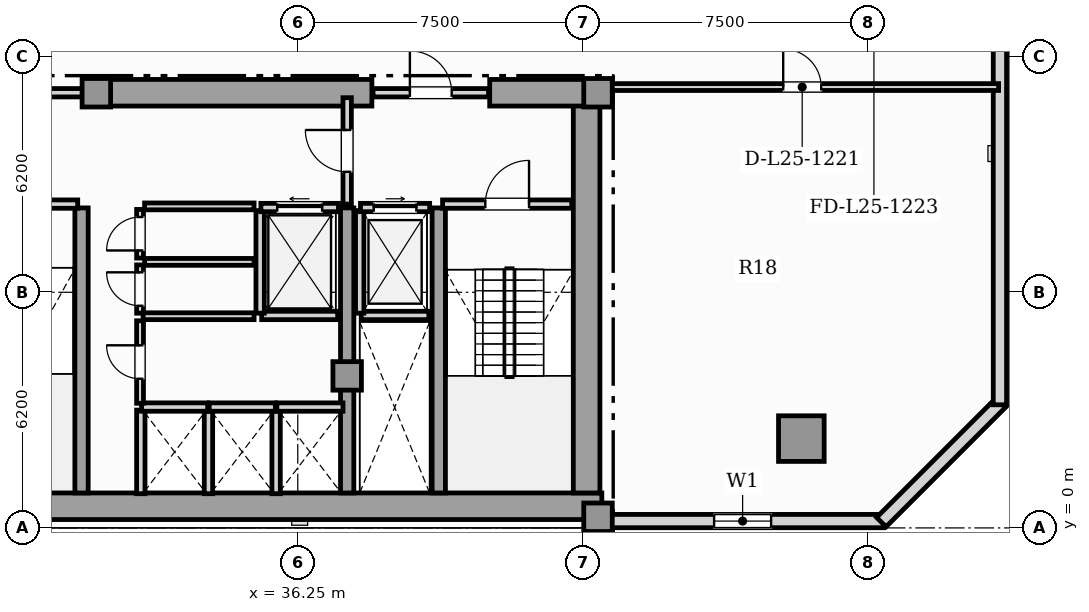
"""IFC4 building model, lengths in metres.
Left out: names, types, materials, properties, quantities, classifications, styles, units other than length and angle.
Written with IfcOpenShell. Run it as: python <this file> out.ifc"""

import sys

from ifc_helpers import new_model, si_unit, direction, frame, frame_2d, origin, origin_2d, place, context, subcontext, project, spatial, rectangle, hollow_rectangle, extrude, element, fill, save


model = new_model("IFC4")
c1 = context("Model", 3, precision=1e-05, world=origin(), true_north=direction((0.0, 1.0)))
c2 = subcontext(c1, "Body", "Model", "MODEL_VIEW")
j1 = project(units=[si_unit("LENGTHUNIT", "METRE"), si_unit("PLANEANGLEUNIT", "RADIAN")], contexts=[c1])
p1 = place(None, origin())
s1 = spatial("IfcSite", under=j1, at=p1, CompositionType="ELEMENT")
p2 = place(p1, origin())
s2 = spatial("IfcBuilding", under=s1, at=p2, CompositionType="ELEMENT")
p3 = place(p2, frame((0.0, 0.0, 104.15)))
s3 = spatial("IfcBuildingStorey", under=s2, at=p3, CompositionType="ELEMENT", Elevation=104.15)
p4 = place(p3, frame((13.25, 0.57, 0.0), z_axis=(0.0, 0.0, 1.0), x_axis=(1.0, 0.0, 0.0)))
e1 = element("IfcWall", 1, at=p4, inside=s3, PredefinedType="SHEAR", context=c2, shape_type="SweptSolid", body=[
    extrude(rectangle(XDim=31.0, YDim=0.7, at=frame_2d((15.5, 0.0))), origin(), (0.0, 0.0, 1.0), 3.6),
])
p5 = place(p3, frame((43.85, 0.92, 0.0), z_axis=(0.0, 0.0, 1.0), x_axis=(0.0, 1.0, 0.0)))
e2 = element("IfcWall", 2, at=p5, inside=s3, PredefinedType="SHEAR", context=c2, shape_type="SweptSolid", body=[
    extrude(rectangle(XDim=10.53, YDim=0.7, at=frame_2d((5.265, 0.0))), origin(), (0.0, 0.0, 1.0), 3.6),
])
p6 = place(p3, frame((30.9, 11.45, 0.0), z_axis=(0.0, 0.0, 1.0), x_axis=(1.0, 0.0, 0.0)))
e3 = element("IfcWall", 3, at=p6, inside=s3, PredefinedType="SHEAR", context=c2, shape_type="SweptSolid", body=[
    extrude(rectangle(XDim=7.3, YDim=0.7, at=frame_2d((3.65, 0.0))), origin(), (0.0, 0.0, 1.0), 3.6),
])
p7 = place(p3, frame((41.3, 11.45, 0.0), z_axis=(0.0, 0.0, 1.0), x_axis=(1.0, 0.0, 0.0)))
e4 = element("IfcWall", 4, at=p7, inside=s3, PredefinedType="SHEAR", context=c2, shape_type="SweptSolid", body=[
    extrude(rectangle(XDim=2.95, YDim=0.7, at=frame_2d((1.475, 0.0))), origin(), (0.0, 0.0, 1.0), 3.6),
])
for number, where, z_axis, x_axis in (
    (5, (30.56, 0.92, 0.0), (0.0, 0.0, 1.0), (0.0, 1.0, 0.0)),
    (6, (37.55, 0.92, 0.0), (0.0, 0.0, 1.0), (0.0, 1.0, 0.0)),
    (7, (39.96, 0.92, 0.0), (0.0, 0.0, 1.0), (0.0, 1.0, 0.0)),
):
    element("IfcWall", number, at=place(p3, frame(where, z_axis=z_axis, x_axis=x_axis)), inside=s3, PredefinedType="SHEAR", context=c2, shape_type="SweptSolid", body=[
        extrude(rectangle(XDim=7.5, YDim=0.35, at=frame_2d((3.75, 0.0))), origin(), (0.0, 0.0, 1.0), 3.6),
    ])
for number, where, z_axis, x_axis in (
    (8, (44.15, 0.28, 0.0), (0.0, 0.0, 1.0), (1.0, 0.0, 0.0)),
    (9, (44.15, 11.45, 0.0), (0.0, 0.0, 1.0), (1.0, 0.0, 0.0)),
    (10, (37.55, 4.0, 0.0), (0.0, 0.0, 1.0), (1.0, 0.0, 0.0)),
    (11, (30.95, 11.45, 0.0), (0.0, 0.0, 1.0), (1.0, 0.0, 0.0)),
):
    element("IfcColumn", number, at=place(p3, frame(where, z_axis=z_axis, x_axis=x_axis)), inside=s3, PredefinedType="COLUMN", context=c2, shape_type="SweptSolid", body=[
        extrude(rectangle(XDim=0.75, YDim=0.75, at=origin_2d()), origin(), (0.0, 0.0, 1.0), 3.85),
    ])
p8 = place(p3, frame((49.5, 2.35, 0.0), z_axis=(0.0, 0.0, 1.0), x_axis=(1.0, 0.0, 0.0)))
e12 = element("IfcColumn", 12, at=p8, inside=s3, PredefinedType="USERDEFINED", context=c2, shape_type="SweptSolid", body=[
    extrude(hollow_rectangle(XDim=1.2, YDim=1.2, WallThickness=0.07, at=origin_2d()), origin(), (0.0, 0.0, 1.0), 3.85),
])
p9 = place(p3, frame((44.25, 0.18, 0.0), z_axis=(0.0, 0.0, 1.0), x_axis=(1.0, 0.0, 0.0)))
e13 = element("IfcWall", 13, at=p9, inside=s3, PredefinedType="SOLIDWALL", context=c2, shape_type="SweptSolid", body=[
    extrude(rectangle(XDim=7.41, YDim=0.35, at=frame_2d((3.705, 0.0))), origin(), (0.0, 0.0, 1.0), 3.6),
])
p10 = place(p9, frame((2.955, 0.0, 0.9)))
e14 = element("IfcOpeningElement", 14, at=p10, cuts=e13, PredefinedType="OPENING", context=c2, shape_type="SweptSolid", body=[
    extrude(rectangle(XDim=1.5, YDim=1.95, at=frame_2d((0.75, 0.975))), frame((0.0, 0.185, 0.0), z_axis=(0.0, -1.0, 0.0), x_axis=(1.0, 0.0, 0.0)), (0.0, 0.0, 1.0), 0.37),
])
p11 = place(p3, frame((51.604, 0.152, 0.0), z_axis=(0.0, 0.0, 1.0), x_axis=(0.707134240044, 0.707079321262, 0.0)))
e15 = element("IfcWall", 15, at=p11, inside=s3, PredefinedType="SOLIDWALL", context=c2, shape_type="SweptSolid", body=[
    extrude(rectangle(XDim=4.446, YDim=0.35, at=frame_2d((2.223, 0.0))), origin(), (0.0, 0.0, 1.0), 3.6),
])
p12 = place(p3, frame((54.725, 3.24, 0.0), z_axis=(0.0, 0.0, 1.0), x_axis=(0.0, 1.0, 0.0)))
e16 = element("IfcWall", 16, at=p12, inside=s3, PredefinedType="SOLIDWALL", context=c2, shape_type="SweptSolid", body=[
    extrude(rectangle(XDim=19.77, YDim=0.35, at=frame_2d((9.885, 0.0))), origin(), (0.0, 0.0, 1.0), 3.6),
])
p13 = place(p12, frame((12.784, 0.0, 0.9)))
e17 = element("IfcOpeningElement", 17, at=p13, cuts=e16, PredefinedType="OPENING", context=c2, shape_type="SweptSolid", body=[
    extrude(rectangle(XDim=1.5, YDim=1.95, at=frame_2d((0.75, 0.975))), frame((0.0, 0.185, 0.0), z_axis=(0.0, -1.0, 0.0), x_axis=(1.0, 0.0, 0.0)), (0.0, 0.0, 1.0), 0.37),
])
p14 = place(p3, frame((37.92, 5.59, 0.0), z_axis=(0.0, 0.0, 1.0), x_axis=(1.0, 0.0, 0.0)))
e18 = element("IfcWall", 18, at=p14, inside=s3, PredefinedType="SOLIDWALL", context=c2, shape_type="SweptSolid", body=[
    extrude(rectangle(XDim=1.78, YDim=0.22, at=frame_2d((0.89, 0.0))), origin(), (0.0, 0.0, 1.0), 3.6),
])
p15 = place(p3, frame((37.88, 5.65, 0.0), z_axis=(0.0, 0.0, 1.0), x_axis=(0.0, 1.0, 0.0)))
e19 = element("IfcWall", 19, at=p15, inside=s3, PredefinedType="SOLIDWALL", context=c2, shape_type="SweptSolid", body=[
    extrude(rectangle(XDim=2.7, YDim=0.22, at=frame_2d((1.35, 0.0))), origin(), (0.0, 0.0, 1.0), 3.6),
])
p16 = place(p3, frame((37.9, 8.43, 0.0), z_axis=(0.0, 0.0, 1.0), x_axis=(1.0, 0.0, 0.0)))
e20 = element("IfcWall", 20, at=p16, inside=s3, PredefinedType="SOLIDWALL", context=c2, shape_type="SweptSolid", body=[
    extrude(rectangle(XDim=1.82, YDim=0.22, at=frame_2d((0.91, 0.0))), origin(), (0.0, 0.0, 1.0), 3.6),
])
p17 = place(p16, frame((0.35, 0.0, 0.0)))
e21 = element("IfcOpeningElement", 21, at=p17, cuts=e20, PredefinedType="OPENING", context=c2, shape_type="SweptSolid", body=[
    extrude(rectangle(XDim=1.12, YDim=2.25, at=frame_2d((0.56, 1.125))), frame((0.0, 0.12, 0.0), z_axis=(0.0, -1.0, 0.0), x_axis=(1.0, 0.0, 0.0)), (0.0, 0.0, 1.0), 0.24),
])
p18 = place(p3, frame((35.3, 5.59, 0.0), z_axis=(0.0, 0.0, 1.0), x_axis=(1.0, 0.0, 0.0)))
e22 = element("IfcWall", 22, at=p18, inside=s3, PredefinedType="SOLIDWALL", context=c2, shape_type="SweptSolid", body=[
    extrude(rectangle(XDim=2.0, YDim=0.22, at=frame_2d((1.0, 0.0))), origin(), (0.0, 0.0, 1.0), 3.6),
])
p19 = place(p3, frame((35.26, 5.65, 0.0), z_axis=(0.0, 0.0, 1.0), x_axis=(0.0, 1.0, 0.0)))
e23 = element("IfcWall", 23, at=p19, inside=s3, PredefinedType="SOLIDWALL", context=c2, shape_type="SweptSolid", body=[
    extrude(rectangle(XDim=2.7, YDim=0.22, at=frame_2d((1.35, 0.0))), origin(), (0.0, 0.0, 1.0), 3.6),
])
p20 = place(p3, frame((35.28, 8.43, 0.0), z_axis=(0.0, 0.0, 1.0), x_axis=(1.0, 0.0, 0.0)))
e24 = element("IfcWall", 24, at=p20, inside=s3, PredefinedType="SOLIDWALL", context=c2, shape_type="SweptSolid", body=[
    extrude(rectangle(XDim=2.04, YDim=0.22, at=frame_2d((1.02, 0.0))), origin(), (0.0, 0.0, 1.0), 3.6),
])
p21 = place(p20, frame((0.43, 0.0, 0.0)))
e25 = element("IfcOpeningElement", 25, at=p21, cuts=e24, PredefinedType="OPENING", context=c2, shape_type="SweptSolid", body=[
    extrude(rectangle(XDim=1.18, YDim=2.2, at=frame_2d((0.59, 1.1))), frame((0.0, 0.12, 0.0), z_axis=(0.0, -1.0, 0.0), x_axis=(1.0, 0.0, 0.0)), (0.0, 0.0, 1.0), 0.24),
])
for number, where, z_axis, x_axis in (
    (26, (32.12, 0.9, 0.0), (0.0, 0.0, 1.0), (0.0, 1.0, 0.0)),
    (27, (33.9, 0.9, 0.0), (0.0, 0.0, 1.0), (0.0, 1.0, 0.0)),
):
    element("IfcWall", number, at=place(p3, frame(where, z_axis=z_axis, x_axis=x_axis)), inside=s3, PredefinedType="SOLIDWALL", context=c2, shape_type="SweptSolid", body=[
        extrude(rectangle(XDim=2.2, YDim=0.22, at=frame_2d((1.1, 0.0))), origin(), (0.0, 0.0, 1.0), 3.6),
    ])
p22 = place(p3, frame((32.14, 3.18, 0.0), z_axis=(0.0, 0.0, 1.0), x_axis=(1.0, 0.0, 0.0)))
e28 = element("IfcWall", 28, at=p22, inside=s3, PredefinedType="SOLIDWALL", context=c2, shape_type="SweptSolid", body=[
    extrude(rectangle(XDim=1.74, YDim=0.22, at=frame_2d((0.87, 0.0))), origin(), (0.0, 0.0, 1.0), 3.6),
])
p23 = place(p3, frame((35.68, 0.9, 0.0), z_axis=(0.0, 0.0, 1.0), x_axis=(0.0, 1.0, 0.0)))
e29 = element("IfcWall", 29, at=p23, inside=s3, PredefinedType="SOLIDWALL", context=c2, shape_type="SweptSolid", body=[
    extrude(rectangle(XDim=2.2, YDim=0.22, at=frame_2d((1.1, 0.0))), origin(), (0.0, 0.0, 1.0), 3.6),
])
for number, where, z_axis, x_axis in (
    (30, (33.92, 3.18, 0.0), (0.0, 0.0, 1.0), (1.0, 0.0, 0.0)),
    (31, (35.7, 3.18, 0.0), (0.0, 0.0, 1.0), (1.0, 0.0, 0.0)),
):
    element("IfcWall", number, at=place(p3, frame(where, z_axis=z_axis, x_axis=x_axis)), inside=s3, PredefinedType="SOLIDWALL", context=c2, shape_type="SweptSolid", body=[
        extrude(rectangle(XDim=1.74, YDim=0.22, at=frame_2d((0.87, 0.0))), origin(), (0.0, 0.0, 1.0), 3.6),
    ])
p24 = place(p3, frame((40.06, 8.52, 0.0), z_axis=(0.0, 0.0, 1.0), x_axis=(1.0, 0.0, 0.0)))
e32 = element("IfcWall", 32, at=p24, inside=s3, PredefinedType="SOLIDWALL", context=c2, shape_type="SweptSolid", body=[
    extrude(rectangle(XDim=3.4, YDim=0.22, at=frame_2d((1.7, 0.0))), origin(), (0.0, 0.0, 1.0), 3.6),
])
p25 = place(p24, frame((1.125, 0.0, 0.0)))
e33 = element("IfcOpeningElement", 33, at=p25, cuts=e32, PredefinedType="OPENING", context=c2, shape_type="SweptSolid", body=[
    extrude(rectangle(XDim=1.15, YDim=2.2, at=frame_2d((0.575, 1.1))), frame((0.0, 0.12, 0.0), z_axis=(0.0, -1.0, 0.0), x_axis=(1.0, 0.0, 0.0)), (0.0, 0.0, 1.0), 0.24),
])
p26 = place(p3, frame((27.04, 8.52, 0.0), z_axis=(0.0, 0.0, 1.0), x_axis=(1.0, 0.0, 0.0)))
e34 = element("IfcWall", 34, at=p26, inside=s3, PredefinedType="SOLIDWALL", context=c2, shape_type="SweptSolid", body=[
    extrude(rectangle(XDim=3.42, YDim=0.22, at=frame_2d((1.71, 0.0))), origin(), (0.0, 0.0, 1.0), 3.6),
])
p27 = place(p26, frame((1.135, 0.0, 0.0)))
e35 = element("IfcOpeningElement", 35, at=p27, cuts=e34, PredefinedType="OPENING", context=c2, shape_type="SweptSolid", body=[
    extrude(rectangle(XDim=1.15, YDim=2.2, at=frame_2d((0.575, 1.1))), frame((0.0, 0.12, 0.0), z_axis=(0.0, -1.0, 0.0), x_axis=(1.0, 0.0, 0.0)), (0.0, 0.0, 1.0), 0.24),
])
p28 = place(p3, frame((37.55, 8.52, 0.0), z_axis=(0.0, 0.0, 1.0), x_axis=(0.0, 1.0, 0.0)))
e36 = element("IfcWall", 36, at=p28, inside=s3, PredefinedType="SOLIDWALL", context=c2, shape_type="SweptSolid", body=[
    extrude(rectangle(XDim=2.8, YDim=0.22, at=frame_2d((1.4, 0.0))), origin(), (0.0, 0.0, 1.0), 3.056),
])
p29 = place(p28, frame((0.85, 0.0, 0.0)))
e37 = element("IfcOpeningElement", 37, at=p29, cuts=e36, PredefinedType="OPENING", context=c2, shape_type="SweptSolid", body=[
    extrude(rectangle(XDim=1.1, YDim=2.2, at=frame_2d((0.55, 1.1))), frame((0.0, 0.12, 0.0), z_axis=(0.0, -1.0, 0.0), x_axis=(1.0, 0.0, 0.0)), (0.0, 0.0, 1.0), 0.24),
])
p30 = place(p3, frame((26.63, 11.45, 0.0), z_axis=(0.0, 0.0, 1.0), x_axis=(1.0, 0.0, 0.0)))
e38 = element("IfcWall", 38, at=p30, inside=s3, PredefinedType="SOLIDWALL", context=c2, shape_type="SweptSolid", body=[
    extrude(rectangle(XDim=4.24, YDim=0.22, at=frame_2d((2.12, 0.0))), origin(), (0.0, 0.0, 1.0), 3.6),
])
p31 = place(p30, frame((1.42, 0.0, 0.0)))
e39 = element("IfcOpeningElement", 39, at=p31, cuts=e38, PredefinedType="OPENING", context=c2, shape_type="SweptSolid", body=[
    extrude(rectangle(XDim=1.4, YDim=2.2, at=frame_2d((0.7, 1.1))), frame((0.0, 0.12, 0.0), z_axis=(0.0, -1.0, 0.0), x_axis=(1.0, 0.0, 0.0)), (0.0, 0.0, 1.0), 0.24),
])
p32 = place(p3, frame((38.23, 11.45, 0.0), z_axis=(0.0, 0.0, 1.0), x_axis=(1.0, 0.0, 0.0)))
e40 = element("IfcWall", 40, at=p32, inside=s3, PredefinedType="SOLIDWALL", context=c2, shape_type="SweptSolid", body=[
    extrude(rectangle(XDim=3.04, YDim=0.22, at=frame_2d((1.52, 0.0))), origin(), (0.0, 0.0, 1.0), 3.6),
])
p33 = place(p32, frame((0.97, 0.0, 0.0)))
e41 = element("IfcOpeningElement", 41, at=p33, cuts=e40, PredefinedType="OPENING", context=c2, shape_type="SweptSolid", body=[
    extrude(rectangle(XDim=1.1, YDim=2.2, at=frame_2d((0.55, 1.1))), frame((0.0, 0.12, 0.0), z_axis=(0.0, -1.0, 0.0), x_axis=(1.0, 0.0, 0.0)), (0.0, 0.0, 1.0), 0.24),
])
p34 = place(p3, frame((32.1, 5.65, 0.0), z_axis=(0.0, 0.0, 1.0), x_axis=(0.0, 1.0, 0.0)))
e42 = element("IfcWall", 42, at=p34, inside=s3, PredefinedType="PARTITIONING", context=c2, shape_type="SweptSolid", body=[
    extrude(rectangle(XDim=1.27, YDim=0.18, at=frame_2d((0.635, 0.0))), origin(), (0.0, 0.0, 1.0), 3.6),
])
p35 = place(p34, frame((0.195, 0.0, 0.0)))
e43 = element("IfcOpeningElement", 43, at=p35, cuts=e42, PredefinedType="OPENING", context=c2, shape_type="SweptSolid", body=[
    extrude(rectangle(XDim=0.88, YDim=2.05, at=frame_2d((0.44, 1.025))), frame((0.0, 0.1, 0.0), z_axis=(0.0, -1.0, 0.0), x_axis=(1.0, 0.0, 0.0)), (0.0, 0.0, 1.0), 0.2),
])
p36 = place(p3, frame((32.22, 7.0, 0.0), z_axis=(0.0, 0.0, 1.0), x_axis=(1.0, 0.0, 0.0)))
e44 = element("IfcWall", 44, at=p36, inside=s3, PredefinedType="PARTITIONING", context=c2, shape_type="SweptSolid", body=[
    extrude(rectangle(XDim=2.88, YDim=0.18, at=frame_2d((1.44, 0.0))), origin(), (0.0, 0.0, 1.0), 3.6),
])
p37 = place(p3, frame((32.18, 5.57, 0.0), z_axis=(0.0, 0.0, 1.0), x_axis=(1.0, 0.0, 0.0)))
e45 = element("IfcWall", 45, at=p37, inside=s3, PredefinedType="PARTITIONING", context=c2, shape_type="SweptSolid", body=[
    extrude(rectangle(XDim=2.92, YDim=0.18, at=frame_2d((1.46, 0.0))), origin(), (0.0, 0.0, 1.0), 3.6),
])
p38 = place(p3, frame((32.1, 7.1, 0.0), z_axis=(0.0, 0.0, 1.0), x_axis=(0.0, 1.0, 0.0)))
e46 = element("IfcWall", 46, at=p38, inside=s3, PredefinedType="PARTITIONING", context=c2, shape_type="SweptSolid", body=[
    extrude(rectangle(XDim=1.28, YDim=0.18, at=frame_2d((0.64, 0.0))), origin(), (0.0, 0.0, 1.0), 3.6),
])
p39 = place(p38, frame((0.2, 0.0, 0.0)))
e47 = element("IfcOpeningElement", 47, at=p39, cuts=e46, PredefinedType="OPENING", context=c2, shape_type="SweptSolid", body=[
    extrude(rectangle(XDim=0.88, YDim=2.05, at=frame_2d((0.44, 1.025))), frame((0.0, 0.1, 0.0), z_axis=(0.0, -1.0, 0.0), x_axis=(1.0, 0.0, 0.0)), (0.0, 0.0, 1.0), 0.2),
])
p40 = place(p3, frame((32.22, 8.46, 0.0), z_axis=(0.0, 0.0, 1.0), x_axis=(1.0, 0.0, 0.0)))
e48 = element("IfcWall", 48, at=p40, inside=s3, PredefinedType="PARTITIONING", context=c2, shape_type="SweptSolid", body=[
    extrude(rectangle(XDim=2.88, YDim=0.18, at=frame_2d((1.44, 0.0))), origin(), (0.0, 0.0, 1.0), 3.6),
])
p41 = place(p3, frame((32.1, 3.28, 0.0), z_axis=(0.0, 0.0, 1.0), x_axis=(0.0, 1.0, 0.0)))
e49 = element("IfcWall", 49, at=p41, inside=s3, PredefinedType="PARTITIONING", context=c2, shape_type="SweptSolid", body=[
    extrude(rectangle(XDim=2.17, YDim=0.18, at=frame_2d((1.085, 0.0))), origin(), (0.0, 0.0, 1.0), 3.6),
])
p42 = place(p41, frame((0.645, 0.0, 0.0)))
e50 = element("IfcOpeningElement", 50, at=p42, cuts=e49, PredefinedType="OPENING", context=c2, shape_type="SweptSolid", body=[
    extrude(rectangle(XDim=0.88, YDim=2.05, at=frame_2d((0.44, 1.025))), frame((0.0, 0.1, 0.0), z_axis=(0.0, -1.0, 0.0), x_axis=(1.0, 0.0, 0.0)), (0.0, 0.0, 1.0), 0.2),
])
p43 = place(p3, frame((44.355, 11.6, 0.0), z_axis=(0.0, 0.0, 1.0), x_axis=(1.0, 0.0, 0.0)))
e51 = element("IfcWall", 51, at=p43, inside=s3, PredefinedType="PARTITIONING", context=c2, shape_type="SweptSolid", body=[
    extrude(rectangle(XDim=10.335, YDim=0.18, at=frame_2d((5.167, 0.0))), origin(), (0.0, 0.0, 1.0), 3.6),
])
p44 = place(p43, frame((4.667, 0.0, 0.0)))
e52 = element("IfcOpeningElement", 52, at=p44, cuts=e51, PredefinedType="OPENING", context=c2, shape_type="SweptSolid", body=[
    extrude(rectangle(XDim=1.0, YDim=2.15, at=frame_2d((0.5, 1.075))), frame((0.0, 0.1, 0.0), z_axis=(0.0, -1.0, 0.0), x_axis=(1.0, 0.0, 0.0)), (0.0, 0.0, 1.0), 0.2),
])
p45 = place(p10, origin())
e53 = element("IfcWindow", 53, at=p45, inside=s3, PartitioningType="SINGLE_PANEL", PredefinedType="WINDOW", context=c2, shape_type="SweptSolid", body=[
    extrude(rectangle(XDim=1.5, YDim=1.95, at=frame_2d((0.75, 0.975))), frame((0.0, 0.03, 0.0), z_axis=(0.0, -1.0, 0.0), x_axis=(1.0, 0.0, 0.0)), (0.0, 0.0, 1.0), 0.06),
])
fill(e14, e53)
p46 = place(p17, origin())
e54 = element("IfcDoor", 54, at=p46, inside=s3, OperationType="SLIDING_TO_RIGHT", PredefinedType="DOOR", context=c2, shape_type="SweptSolid", body=[
    extrude(rectangle(XDim=1.12, YDim=2.25, at=frame_2d((0.56, 1.125))), frame((0.0, 0.025, 0.0), z_axis=(0.0, -1.0, 0.0), x_axis=(1.0, 0.0, 0.0)), (0.0, 0.0, 1.0), 0.05),
])
fill(e21, e54)
p47 = place(p21, origin())
e55 = element("IfcDoor", 55, at=p47, inside=s3, OperationType="SLIDING_TO_LEFT", PredefinedType="DOOR", context=c2, shape_type="SweptSolid", body=[
    extrude(rectangle(XDim=1.18, YDim=2.2, at=frame_2d((0.59, 1.1))), frame((0.0, 0.025, 0.0), z_axis=(0.0, -1.0, 0.0), x_axis=(1.0, 0.0, 0.0)), (0.0, 0.0, 1.0), 0.05),
])
fill(e25, e55)
p48 = place(p25, origin())
e56 = element("IfcDoor", 56, at=p48, inside=s3, OperationType="SINGLE_SWING_RIGHT", PredefinedType="DOOR", context=c2, shape_type="SweptSolid", body=[
    extrude(rectangle(XDim=1.15, YDim=2.2, at=frame_2d((0.575, 1.1))), frame((0.0, 0.025, 0.0), z_axis=(0.0, -1.0, 0.0), x_axis=(1.0, 0.0, 0.0)), (0.0, 0.0, 1.0), 0.05),
])
fill(e33, e56)
p49 = place(p29, origin())
e57 = element("IfcDoor", 57, at=p49, inside=s3, OperationType="SINGLE_SWING_RIGHT", PredefinedType="DOOR", context=c2, shape_type="SweptSolid", body=[
    extrude(rectangle(XDim=1.1, YDim=2.2, at=frame_2d((0.55, 1.1))), frame((0.0, 0.025, 0.0), z_axis=(0.0, -1.0, 0.0), x_axis=(1.0, 0.0, 0.0)), (0.0, 0.0, 1.0), 0.05),
])
fill(e37, e57)
p50 = place(p33, origin())
e58 = element("IfcDoor", 58, at=p50, inside=s3, OperationType="SINGLE_SWING_LEFT", PredefinedType="DOOR", context=c2, shape_type="SweptSolid", body=[
    extrude(rectangle(XDim=1.1, YDim=2.2, at=frame_2d((0.55, 1.1))), frame((0.0, 0.025, 0.0), z_axis=(0.0, -1.0, 0.0), x_axis=(1.0, 0.0, 0.0)), (0.0, 0.0, 1.0), 0.05),
])
fill(e41, e58)
p51 = place(p35, origin())
e59 = element("IfcDoor", 59, at=p51, inside=s3, OperationType="SINGLE_SWING_RIGHT", PredefinedType="DOOR", context=c2, shape_type="SweptSolid", body=[
    extrude(rectangle(XDim=0.88, YDim=2.05, at=frame_2d((0.44, 1.025))), frame((0.0, 0.025, 0.0), z_axis=(0.0, -1.0, 0.0), x_axis=(1.0, 0.0, 0.0)), (0.0, 0.0, 1.0), 0.05),
])
fill(e43, e59)
p52 = place(p39, origin())
e60 = element("IfcDoor", 60, at=p52, inside=s3, OperationType="SINGLE_SWING_LEFT", PredefinedType="DOOR", context=c2, shape_type="SweptSolid", body=[
    extrude(rectangle(XDim=0.88, YDim=2.05, at=frame_2d((0.44, 1.025))), frame((0.0, 0.025, 0.0), z_axis=(0.0, -1.0, 0.0), x_axis=(1.0, 0.0, 0.0)), (0.0, 0.0, 1.0), 0.05),
])
fill(e47, e60)
p53 = place(p42, origin())
e61 = element("IfcDoor", 61, at=p53, inside=s3, OperationType="SINGLE_SWING_RIGHT", PredefinedType="DOOR", context=c2, shape_type="SweptSolid", body=[
    extrude(rectangle(XDim=0.88, YDim=2.05, at=frame_2d((0.44, 1.025))), frame((0.0, 0.025, 0.0), z_axis=(0.0, -1.0, 0.0), x_axis=(1.0, 0.0, 0.0)), (0.0, 0.0, 1.0), 0.05),
])
fill(e50, e61)
p54 = place(p44, origin())
e62 = element("IfcDoor", 62, at=p54, inside=s3, OperationType="SINGLE_SWING_LEFT", PredefinedType="DOOR", context=c2, shape_type="SweptSolid", body=[
    extrude(rectangle(XDim=1.0, YDim=2.15, at=frame_2d((0.5, 1.075))), frame((0.0, 0.025, 0.0), z_axis=(0.0, -1.0, 0.0), x_axis=(1.0, 0.0, 0.0)), (0.0, 0.0, 1.0), 0.05),
])
fill(e52, e62)
save(model, sys.argv[1])
